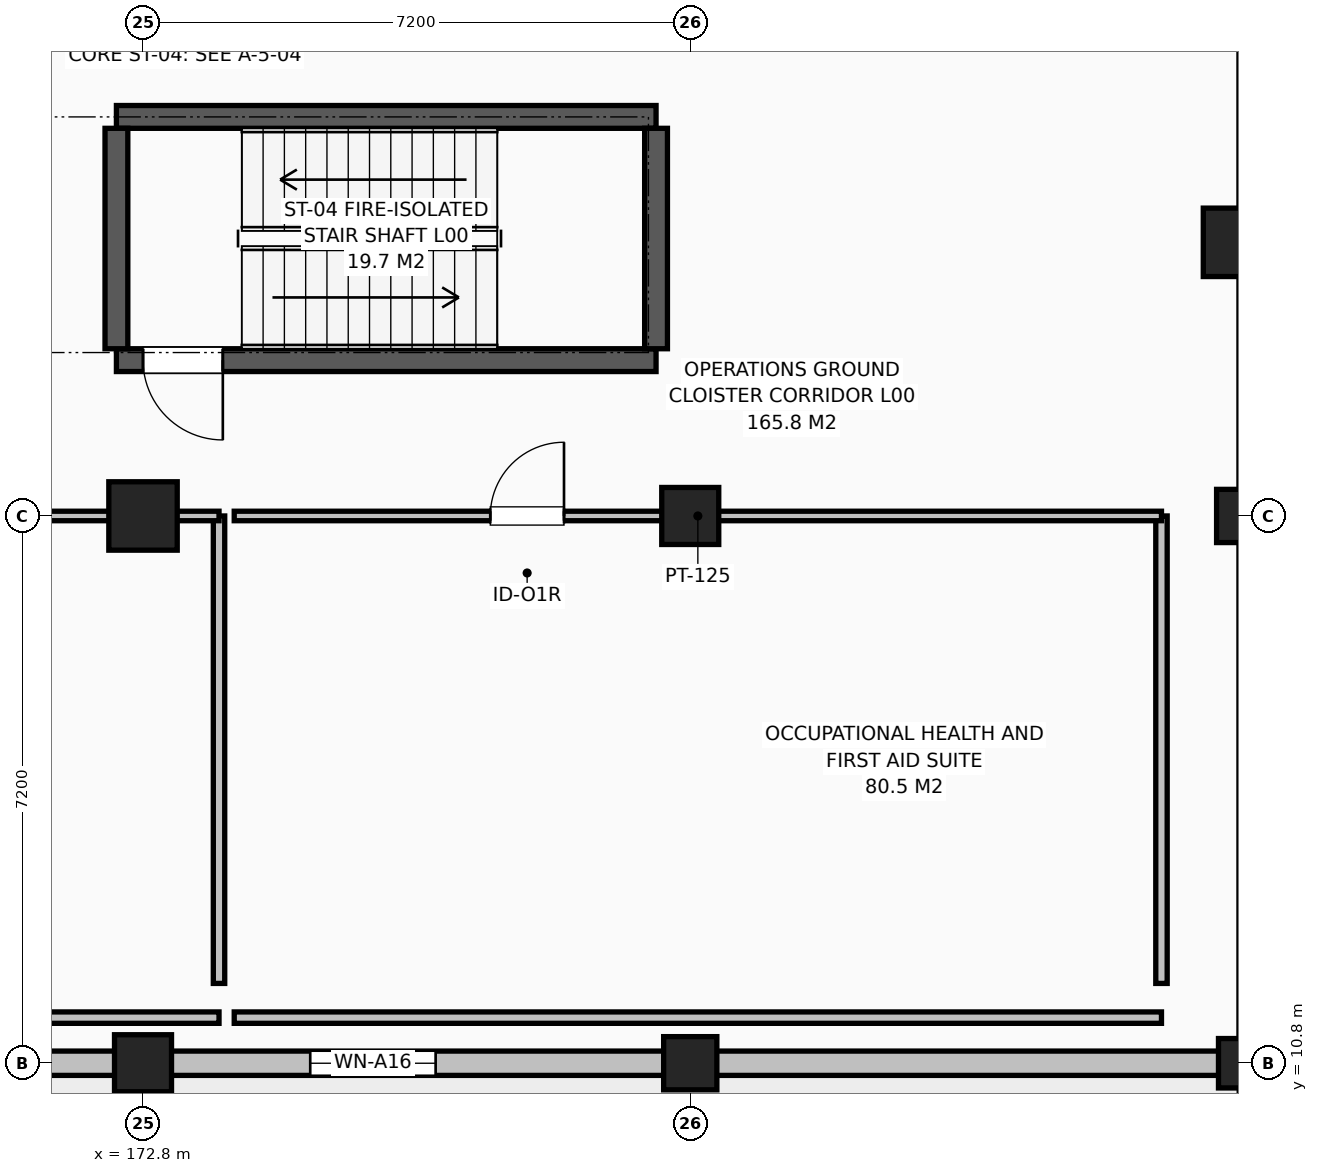
"""IFC4 building model, lengths in metres.
Left out: names, types, materials, properties, quantities, classifications, styles, units other than length and angle.
Written with IfcOpenShell. Run it as: python <this file> out.ifc"""

import sys

from ifc_helpers import new_model, si_unit, direction, frame, frame_2d, origin, origin_2d, place, context, subcontext, project, spatial, rectangle, circle, extrude, element, fill, save


model = new_model("IFC4")
c1 = context("Model", 3, precision=1e-05, world=origin(), true_north=direction((0.0, 1.0)))
c2 = subcontext(c1, "Body", "Model", "MODEL_VIEW")
j1 = project(units=[si_unit("LENGTHUNIT", "METRE"), si_unit("PLANEANGLEUNIT", "RADIAN")], contexts=[c1])
p1 = place(None, origin())
s1 = spatial("IfcSite", under=j1, at=p1, CompositionType="ELEMENT")
p2 = place(p1, origin())
s2 = spatial("IfcBuilding", under=s1, at=p2, CompositionType="ELEMENT")
p3 = place(p2, origin())
s3 = spatial("IfcBuildingStorey", under=s2, at=p3, CompositionType="ELEMENT", Elevation=0.0)
p4 = place(p3, frame((172.8, 10.8, 0.0), z_axis=(0.0, 0.0, 1.0), x_axis=(1.0, 0.0, 0.0)))
e1 = element("IfcColumn", 1, at=p4, inside=s3, PredefinedType="COLUMN", context=c2, shape_type="SweptSolid", body=[
    extrude(circle(Radius=0.375, at=origin_2d()), origin(), (0.0, 0.0, 1.0), 4.8),
])
p5 = place(p3, frame((172.8, 18.0, 0.0), z_axis=(0.0, 0.0, 1.0), x_axis=(1.0, 0.0, 0.0)))
e2 = element("IfcColumn", 2, at=p5, inside=s3, PredefinedType="COLUMN", context=c2, shape_type="SweptSolid", body=[
    extrude(circle(Radius=0.45, at=origin_2d()), origin(), (0.0, 0.0, 1.0), 4.8),
])
p6 = place(p3, frame((180.0, 10.8, 0.0), z_axis=(0.0, 0.0, 1.0), x_axis=(1.0, 0.0, 0.0)))
e3 = element("IfcColumn", 3, at=p6, inside=s3, PredefinedType="COLUMN", context=c2, shape_type="SweptSolid", body=[
    extrude(rectangle(XDim=0.7, YDim=0.7, at=origin_2d()), origin(), (0.0, 0.0, 1.0), 4.8),
])
p7 = place(p3, frame((180.0, 18.0, 0.0), z_axis=(0.0, 0.0, 1.0), x_axis=(1.0, 0.0, 0.0)))
e4 = element("IfcColumn", 4, at=p7, inside=s3, PredefinedType="COLUMN", context=c2, shape_type="SweptSolid", body=[
    extrude(rectangle(XDim=0.75, YDim=0.75, at=origin_2d()), origin(), (0.0, 0.0, 1.0), 4.8),
])
p8 = place(p3, frame((187.2, 10.8, 0.0), z_axis=(0.0, 0.0, 1.0), x_axis=(1.0, 0.0, 0.0)))
e5 = element("IfcColumn", 5, at=p8, inside=s3, PredefinedType="COLUMN", context=c2, shape_type="SweptSolid", body=[
    extrude(rectangle(XDim=0.5, YDim=0.65, at=origin_2d()), origin(), (0.0, 0.0, 1.0), 4.8),
])
p9 = place(p3, frame((187.2, 18.0, 0.0), z_axis=(0.0, 0.0, 1.0), x_axis=(1.0, 0.0, 0.0)))
e6 = element("IfcColumn", 6, at=p9, inside=s3, PredefinedType="COLUMN", context=c2, shape_type="SweptSolid", body=[
    extrude(rectangle(XDim=0.55, YDim=0.7, at=origin_2d()), origin(), (0.0, 0.0, 1.0), 4.8),
])
p10 = place(p3, frame((187.2, 21.6, 0.0), z_axis=(0.0, 0.0, 1.0), x_axis=(1.0, 0.0, 0.0)))
e7 = element("IfcColumn", 7, at=p10, inside=s3, PredefinedType="COLUMN", context=c2, shape_type="SweptSolid", body=[
    extrude(circle(Radius=0.45, at=origin_2d()), origin(), (0.0, 0.0, 1.0), 4.8),
])
p11 = place(p3, frame((108.0, 10.8, 0.0), z_axis=(0.0, 0.0, 1.0), x_axis=(1.0, 0.0, 0.0)))
e8 = element("IfcWall", 8, at=p11, inside=s3, PredefinedType="SOLIDWALL", context=c2, shape_type="SweptSolid", body=[
    extrude(rectangle(XDim=79.2, YDim=0.32, at=frame_2d((39.6, 0.0))), origin(), (0.0, 0.0, 1.0), 4.25),
])
p12 = place(p11, frame((2.2, 0.0, 0.72)))
e9 = element("IfcOpeningElement", 9, at=p12, cuts=e8, PredefinedType="OPENING", context=c2, shape_type="SweptSolid", body=[
    extrude(rectangle(XDim=1.8, YDim=2.15, at=frame_2d((0.9, 1.075))), frame((0.0, 0.17, 0.0), z_axis=(0.0, -1.0, 0.0), x_axis=(1.0, 0.0, 0.0)), (0.0, 0.0, 1.0), 0.34),
])
p13 = place(p11, frame((9.4, 0.0, 0.72)))
e10 = element("IfcOpeningElement", 10, at=p13, cuts=e8, PredefinedType="OPENING", context=c2, shape_type="SweptSolid", body=[
    extrude(rectangle(XDim=1.2, YDim=2.0, at=frame_2d((0.6, 1.0))), frame((0.0, 0.17, 0.0), z_axis=(0.0, -1.0, 0.0), x_axis=(1.0, 0.0, 0.0)), (0.0, 0.0, 1.0), 0.34),
])
p14 = place(p11, frame((16.6, 0.0, 0.72)))
e11 = element("IfcOpeningElement", 11, at=p14, cuts=e8, PredefinedType="OPENING", context=c2, shape_type="SweptSolid", body=[
    extrude(rectangle(XDim=1.35, YDim=2.05, at=frame_2d((0.675, 1.025))), frame((0.0, 0.17, 0.0), z_axis=(0.0, -1.0, 0.0), x_axis=(1.0, 0.0, 0.0)), (0.0, 0.0, 1.0), 0.34),
])
p15 = place(p11, frame((23.8, 0.0, 0.72)))
e12 = element("IfcOpeningElement", 12, at=p15, cuts=e8, PredefinedType="OPENING", context=c2, shape_type="SweptSolid", body=[
    extrude(rectangle(XDim=1.5, YDim=2.1, at=frame_2d((0.75, 1.05))), frame((0.0, 0.17, 0.0), z_axis=(0.0, -1.0, 0.0), x_axis=(1.0, 0.0, 0.0)), (0.0, 0.0, 1.0), 0.34),
])
p16 = place(p11, frame((31.0, 0.0, 0.72)))
e13 = element("IfcOpeningElement", 13, at=p16, cuts=e8, PredefinedType="OPENING", context=c2, shape_type="SweptSolid", body=[
    extrude(rectangle(XDim=1.65, YDim=2.1, at=frame_2d((0.825, 1.05))), frame((0.0, 0.17, 0.0), z_axis=(0.0, -1.0, 0.0), x_axis=(1.0, 0.0, 0.0)), (0.0, 0.0, 1.0), 0.34),
])
p17 = place(p11, frame((38.2, 0.0, 0.72)))
e14 = element("IfcOpeningElement", 14, at=p17, cuts=e8, PredefinedType="OPENING", context=c2, shape_type="SweptSolid", body=[
    extrude(rectangle(XDim=1.8, YDim=2.15, at=frame_2d((0.9, 1.075))), frame((0.0, 0.17, 0.0), z_axis=(0.0, -1.0, 0.0), x_axis=(1.0, 0.0, 0.0)), (0.0, 0.0, 1.0), 0.34),
])
p18 = place(p11, frame((45.4, 0.0, 0.72)))
e15 = element("IfcOpeningElement", 15, at=p18, cuts=e8, PredefinedType="OPENING", context=c2, shape_type="SweptSolid", body=[
    extrude(rectangle(XDim=1.2, YDim=2.0, at=frame_2d((0.6, 1.0))), frame((0.0, 0.17, 0.0), z_axis=(0.0, -1.0, 0.0), x_axis=(1.0, 0.0, 0.0)), (0.0, 0.0, 1.0), 0.34),
])
p19 = place(p11, frame((52.6, 0.0, 0.72)))
e16 = element("IfcOpeningElement", 16, at=p19, cuts=e8, PredefinedType="OPENING", context=c2, shape_type="SweptSolid", body=[
    extrude(rectangle(XDim=1.35, YDim=2.05, at=frame_2d((0.675, 1.025))), frame((0.0, 0.17, 0.0), z_axis=(0.0, -1.0, 0.0), x_axis=(1.0, 0.0, 0.0)), (0.0, 0.0, 1.0), 0.34),
])
p20 = place(p11, frame((59.8, 0.0, 0.72)))
e17 = element("IfcOpeningElement", 17, at=p20, cuts=e8, PredefinedType="OPENING", context=c2, shape_type="SweptSolid", body=[
    extrude(rectangle(XDim=1.5, YDim=2.1, at=frame_2d((0.75, 1.05))), frame((0.0, 0.17, 0.0), z_axis=(0.0, -1.0, 0.0), x_axis=(1.0, 0.0, 0.0)), (0.0, 0.0, 1.0), 0.34),
])
p21 = place(p11, frame((67.0, 0.0, 0.72)))
e18 = element("IfcOpeningElement", 18, at=p21, cuts=e8, PredefinedType="OPENING", context=c2, shape_type="SweptSolid", body=[
    extrude(rectangle(XDim=1.65, YDim=2.1, at=frame_2d((0.825, 1.05))), frame((0.0, 0.17, 0.0), z_axis=(0.0, -1.0, 0.0), x_axis=(1.0, 0.0, 0.0)), (0.0, 0.0, 1.0), 0.34),
])
p22 = place(p3, frame((172.45, 20.05, 0.0), z_axis=(0.0, 0.0, 1.0), x_axis=(1.0, 0.0, 0.0)))
e19 = element("IfcWall", 19, at=p22, inside=s3, PredefinedType="SHEAR", context=c2, shape_type="SweptSolid", body=[
    extrude(rectangle(XDim=7.1, YDim=0.3, at=frame_2d((3.55, 0.0))), origin(), (0.0, 0.0, 1.0), 4.525),
])
p23 = place(p22, frame((0.35, 0.0, 0.0)))
e20 = element("IfcOpeningElement", 20, at=p23, cuts=e19, PredefinedType="OPENING", context=c2, shape_type="SweptSolid", body=[
    extrude(rectangle(XDim=1.05, YDim=2.15, at=frame_2d((0.525, 1.075))), frame((0.0, 0.16, 0.0), z_axis=(0.0, -1.0, 0.0), x_axis=(1.0, 0.0, 0.0)), (0.0, 0.0, 1.0), 0.32),
])
p24 = place(p3, frame((179.55, 23.25, 0.0), z_axis=(0.0, 0.0, 1.0), x_axis=(-1.0, 0.0, 0.0)))
e21 = element("IfcWall", 21, at=p24, inside=s3, PredefinedType="SHEAR", context=c2, shape_type="SweptSolid", body=[
    extrude(rectangle(XDim=7.1, YDim=0.3, at=frame_2d((3.55, 0.0))), origin(), (0.0, 0.0, 1.0), 4.525),
])
for number, where, z_axis, x_axis in (
    (22, (179.55, 20.2, 0.0), (0.0, 0.0, 1.0), (0.0, 1.0, 0.0)),
    (23, (172.45, 23.1, 0.0), (0.0, 0.0, 1.0), (0.0, -1.0, 0.0)),
):
    element("IfcWall", number, at=place(p3, frame(where, z_axis=z_axis, x_axis=x_axis)), inside=s3, PredefinedType="SHEAR", context=c2, shape_type="SweptSolid", body=[
        extrude(rectangle(XDim=2.9, YDim=0.3, at=frame_2d((1.45, 0.0))), origin(), (0.0, 0.0, 1.0), 4.525),
    ])
p25 = place(p3, frame((173.8, 11.4, 0.0), z_axis=(0.0, 0.0, 1.0), x_axis=(-1.0, 0.0, 0.0)))
e24 = element("IfcWall", 24, at=p25, inside=s3, PredefinedType="PARTITIONING", context=c2, shape_type="SweptSolid", body=[
    extrude(rectangle(XDim=19.6, YDim=0.15, at=frame_2d((9.8, 0.0))), origin(), (0.0, 0.0, 1.0), 3.557),
])
p26 = place(p3, frame((173.8, 11.85, 0.0), z_axis=(0.0, 0.0, 1.0), x_axis=(0.0, 1.0, 0.0)))
e25 = element("IfcWall", 25, at=p26, inside=s3, PredefinedType="PARTITIONING", context=c2, shape_type="SweptSolid", body=[
    extrude(rectangle(XDim=6.15, YDim=0.15, at=frame_2d((3.075, 0.0))), origin(), (0.0, 0.0, 1.0), 3.507),
])
p27 = place(p3, frame((154.2, 18.0, 0.0), z_axis=(0.0, 0.0, 1.0), x_axis=(1.0, 0.0, 0.0)))
e26 = element("IfcWall", 26, at=p27, inside=s3, PredefinedType="PARTITIONING", context=c2, shape_type="SweptSolid", body=[
    extrude(rectangle(XDim=19.6, YDim=0.125, at=frame_2d((9.8, 0.0))), origin(), (0.0, 0.0, 1.0), 3.507),
])
p28 = place(p27, frame((9.32, 0.0, 0.0)))
e27 = element("IfcOpeningElement", 27, at=p28, cuts=e26, PredefinedType="OPENING", context=c2, shape_type="SweptSolid", body=[
    extrude(rectangle(XDim=0.96, YDim=2.15, at=frame_2d((0.48, 1.075))), frame((0.0, 0.073, 0.0), z_axis=(0.0, -1.0, 0.0), x_axis=(1.0, 0.0, 0.0)), (0.0, 0.0, 1.0), 0.145),
])
p29 = place(p3, frame((186.2, 11.4, 0.0), z_axis=(0.0, 0.0, 1.0), x_axis=(-1.0, 0.0, 0.0)))
e28 = element("IfcWall", 28, at=p29, inside=s3, PredefinedType="PARTITIONING", context=c2, shape_type="SweptSolid", body=[
    extrude(rectangle(XDim=12.2, YDim=0.15, at=frame_2d((6.1, 0.0))), origin(), (0.0, 0.0, 1.0), 3.657),
])
p30 = place(p3, frame((186.2, 11.85, 0.0), z_axis=(0.0, 0.0, 1.0), x_axis=(0.0, 1.0, 0.0)))
e29 = element("IfcWall", 29, at=p30, inside=s3, PredefinedType="PARTITIONING", context=c2, shape_type="SweptSolid", body=[
    extrude(rectangle(XDim=6.15, YDim=0.15, at=frame_2d((3.075, 0.0))), origin(), (0.0, 0.0, 1.0), 4.0),
])
p31 = place(p3, frame((174.0, 18.0, 0.0), z_axis=(0.0, 0.0, 1.0), x_axis=(1.0, 0.0, 0.0)))
e30 = element("IfcWall", 30, at=p31, inside=s3, PredefinedType="PARTITIONING", context=c2, shape_type="SweptSolid", body=[
    extrude(rectangle(XDim=12.2, YDim=0.125, at=frame_2d((6.1, 0.0))), origin(), (0.0, 0.0, 1.0), 3.507),
])
p32 = place(p31, frame((3.369, 0.0, 0.0)))
e31 = element("IfcOpeningElement", 31, at=p32, cuts=e30, PredefinedType="OPENING", context=c2, shape_type="SweptSolid", body=[
    extrude(rectangle(XDim=0.97, YDim=2.15, at=frame_2d((0.485, 1.075))), frame((0.0, 0.073, 0.0), z_axis=(0.0, -1.0, 0.0), x_axis=(1.0, 0.0, 0.0)), (0.0, 0.0, 1.0), 0.145),
])
p33 = place(p21, origin())
e32 = element("IfcWindow", 32, at=p33, inside=s3, PartitioningType="SINGLE_PANEL", PredefinedType="WINDOW", context=c2, shape_type="SweptSolid", body=[
    extrude(rectangle(XDim=1.65, YDim=2.1, at=frame_2d((0.825, 1.05))), frame((0.0, 0.03, 0.0), z_axis=(0.0, -1.0, 0.0), x_axis=(1.0, 0.0, 0.0)), (0.0, 0.0, 1.0), 0.06),
])
fill(e18, e32)
p34 = place(p23, frame((1.05, 0.0, 0.0), z_axis=(0.0, 0.0, 1.0), x_axis=(-1.0, 0.0, 0.0)))
e33 = element("IfcDoor", 33, at=p34, inside=s3, OperationType="SINGLE_SWING_LEFT", PredefinedType="DOOR", context=c2, shape_type="SweptSolid", body=[
    extrude(rectangle(XDim=1.05, YDim=2.15, at=frame_2d((0.525, 1.075))), frame((0.0, 0.025, 0.0), z_axis=(0.0, -1.0, 0.0), x_axis=(1.0, 0.0, 0.0)), (0.0, 0.0, 1.0), 0.05),
])
fill(e20, e33)
p35 = place(p32, origin())
e34 = element("IfcDoor", 34, at=p35, inside=s3, OperationType="SINGLE_SWING_RIGHT", PredefinedType="DOOR", context=c2, shape_type="SweptSolid", body=[
    extrude(rectangle(XDim=0.97, YDim=2.15, at=frame_2d((0.485, 1.075))), frame((0.0, 0.025, 0.0), z_axis=(0.0, -1.0, 0.0), x_axis=(1.0, 0.0, 0.0)), (0.0, 0.0, 1.0), 0.05),
])
fill(e31, e34)
save(model, sys.argv[1])
